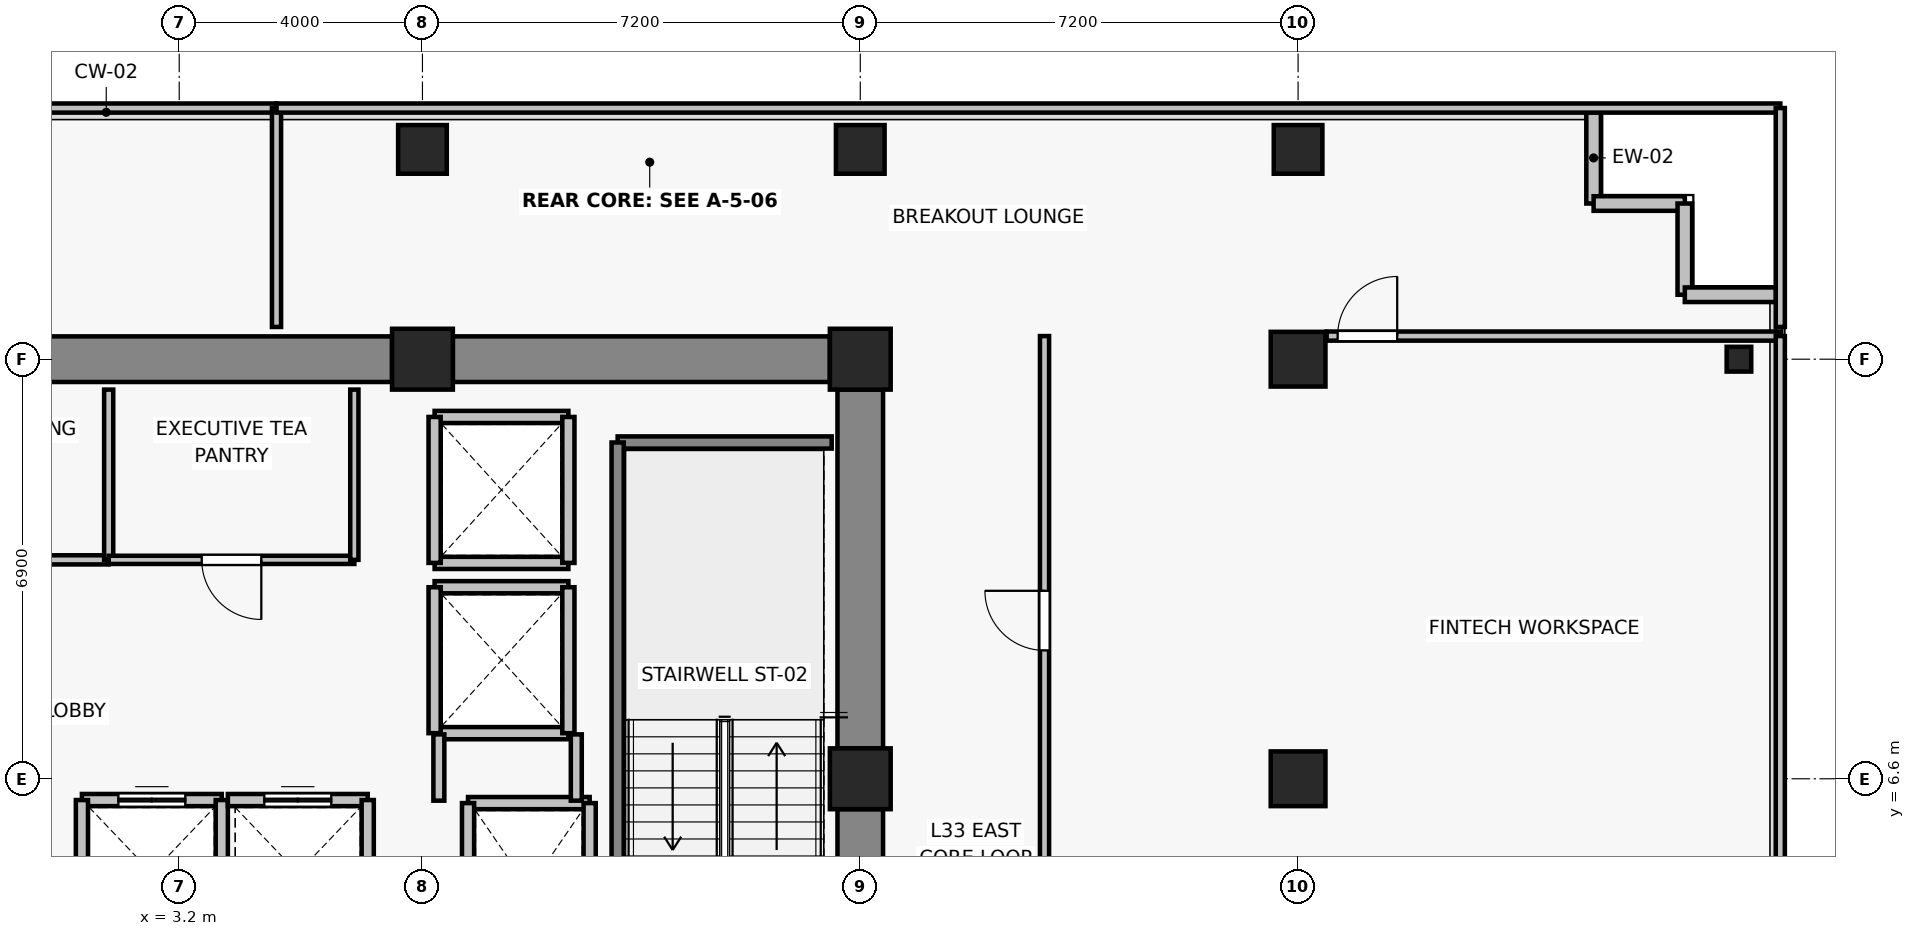
"""IFC4 building model, lengths in metres.
Left out: names, types, materials, properties, quantities, classifications, styles, units other than length and angle.
Written with IfcOpenShell. Run it as: python <this file> out.ifc"""

import sys

from ifc_helpers import new_model, si_unit, direction, frame, frame_2d, origin, origin_2d, place, context, subcontext, project, spatial, rectangle, i_section, extrude, source, transform, mapped, element, fill, save


model = new_model("IFC4")
c1 = context("Model", 3, precision=1e-05, world=origin(), true_north=direction((0.0, 1.0)))
c2 = subcontext(c1, "Body", "Model", "MODEL_VIEW")
j1 = project(units=[si_unit("LENGTHUNIT", "METRE"), si_unit("PLANEANGLEUNIT", "RADIAN")], contexts=[c1])
p1 = place(None, origin())
s1 = spatial("IfcSite", under=j1, at=p1, CompositionType="ELEMENT")
p2 = place(p1, origin())
s2 = spatial("IfcBuilding", under=s1, at=p2, CompositionType="ELEMENT")
p3 = place(p2, frame((0.0, 0.0, 119.8)))
s3 = spatial("IfcBuildingStorey", under=s2, at=p3, CompositionType="ELEMENT", Elevation=119.8)
for number, where, z_axis, x_axis in (
    (1, (14.4, 6.6, 0.0), (0.0, 0.0, 1.0), (1.0, 0.0, 0.0)),
    (2, (7.2, 13.5, 0.0), (0.0, 0.0, 1.0), (1.0, 0.0, 0.0)),
    (3, (14.4, 13.5, 0.0), (0.0, 0.0, 1.0), (1.0, 0.0, 0.0)),
):
    element("IfcColumn", number, at=place(p3, frame(where, z_axis=z_axis, x_axis=x_axis)), inside=s3, PredefinedType="COLUMN", context=c2, shape_type="SweptSolid", body=[
        extrude(rectangle(XDim=1.0, YDim=1.0, at=origin_2d()), origin(), (0.0, 0.0, 1.0), 3.3),
    ])
for number, where, z_axis, x_axis in (
    (4, (21.6, 6.6, 0.0), (0.0, 0.0, 1.0), (1.0, 0.0, 0.0)),
    (5, (21.6, 13.5, 0.0), (0.0, 0.0, 1.0), (1.0, 0.0, 0.0)),
):
    element("IfcColumn", number, at=place(p3, frame(where, z_axis=z_axis, x_axis=x_axis)), inside=s3, PredefinedType="COLUMN", context=c2, shape_type="SweptSolid", body=[
        extrude(rectangle(XDim=0.9, YDim=0.9, at=origin_2d()), origin(), (0.0, 0.0, 1.0), 3.3),
    ])
for number, where, z_axis, x_axis in (
    (6, (7.2, 16.95, 0.0), (0.0, 0.0, 1.0), (1.0, 0.0, 0.0)),
    (7, (14.4, 16.95, 0.0), (0.0, 0.0, 1.0), (1.0, 0.0, 0.0)),
    (8, (21.6, 16.95, 0.0), (0.0, 0.0, 1.0), (1.0, 0.0, 0.0)),
):
    element("IfcColumn", number, at=place(p3, frame(where, z_axis=z_axis, x_axis=x_axis)), inside=s3, PredefinedType="COLUMN", context=c2, shape_type="SweptSolid", body=[
        extrude(rectangle(XDim=0.8, YDim=0.8, at=origin_2d()), origin(), (0.0, 0.0, 1.0), 3.3),
    ])
p4 = place(p3, frame((28.85, 13.5, 0.0), z_axis=(0.0, 0.0, 1.0), x_axis=(1.0, 0.0, 0.0)))
e9 = element("IfcColumn", 9, at=p4, inside=s3, PredefinedType="COLUMN", context=c2, shape_type="SweptSolid", body=[
    extrude(i_section(OverallWidth=0.404, OverallDepth=0.407, WebThickness=0.022, FlangeThickness=0.032, FilletRadius=0.015, at=origin_2d()), origin(), (0.0, 0.0, 1.0), 3.3),
])
p5 = place(p3, frame((-6.7, 13.5, 0.0), z_axis=(0.0, 0.0, 1.0), x_axis=(1.0, 0.0, 0.0)))
e10 = element("IfcWall", 10, at=p5, inside=s3, PredefinedType="SHEAR", context=c2, shape_type="SweptSolid", body=[
    extrude(rectangle(XDim=13.4, YDim=0.75, at=frame_2d((6.7, 0.0))), origin(), (0.0, 0.0, 1.0), 3.075),
])
p6 = place(p3, frame((7.7, 13.5, 0.0), z_axis=(0.0, 0.0, 1.0), x_axis=(1.0, 0.0, 0.0)))
e11 = element("IfcWall", 11, at=p6, inside=s3, PredefinedType="SHEAR", context=c2, shape_type="SweptSolid", body=[
    extrude(rectangle(XDim=6.2, YDim=0.75, at=frame_2d((3.1, 0.0))), origin(), (0.0, 0.0, 1.0), 3.075),
])
p7 = place(p3, frame((14.4, -0.7, 0.0), z_axis=(0.0, 0.0, 1.0), x_axis=(0.0, 1.0, 0.0)))
e12 = element("IfcWall", 12, at=p7, inside=s3, PredefinedType="SHEAR", context=c2, shape_type="SweptSolid", body=[
    extrude(rectangle(XDim=6.8, YDim=0.75, at=frame_2d((3.4, 0.0))), origin(), (0.0, 0.0, 1.0), 3.075),
])
p8 = place(p3, frame((14.4, 7.1, 0.0), z_axis=(0.0, 0.0, 1.0), x_axis=(0.0, 1.0, 0.0)))
e13 = element("IfcWall", 13, at=p8, inside=s3, PredefinedType="SHEAR", context=c2, shape_type="SweptSolid", body=[
    extrude(rectangle(XDim=5.9, YDim=0.75, at=frame_2d((2.95, 0.0))), origin(), (0.0, 0.0, 1.0), 3.075),
])
for number, where, z_axis, x_axis in (
    (14, (26.46, 16.06, 0.0), (0.0, 0.0, 1.0), (0.0, 1.0, 0.0)),
    (15, (27.96, 16.06, 0.0), (0.0, 0.0, 1.0), (-1.0, 0.0, 0.0)),
    (16, (27.96, 14.56, 0.0), (0.0, 0.0, 1.0), (0.0, 1.0, 0.0)),
    (17, (29.46, 14.56, 0.0), (0.0, 0.0, 1.0), (-1.0, 0.0, 0.0)),
):
    element("IfcWall", number, at=place(p3, frame(where, z_axis=z_axis, x_axis=x_axis)), inside=s3, PredefinedType="SOLIDWALL", context=c2, shape_type="SweptSolid", body=[
        extrude(rectangle(XDim=1.5, YDim=0.24, at=frame_2d((0.75, 0.0))), origin(), (0.0, 0.0, 1.0), 3.075),
    ])
p9 = place(p3, frame((7.95, 6.2, 0.0), z_axis=(0.0, 0.0, 1.0), x_axis=(1.0, 0.0, 0.0)))
e18 = element("IfcWall", 18, at=p9, inside=s3, PredefinedType="SOLIDWALL", context=c2, shape_type="SweptSolid", body=[
    extrude(rectangle(XDim=2.0, YDim=0.2, at=frame_2d((1.0, 0.0))), origin(), (0.0, 0.0, 1.0), 3.075),
])
for number, where, z_axis, x_axis in (
    (19, (7.95, 3.4, 0.0), (0.0, 0.0, 1.0), (0.0, 1.0, 0.0)),
    (20, (9.95, 6.2, 0.0), (0.0, 0.0, 1.0), (0.0, -1.0, 0.0)),
):
    element("IfcWall", number, at=place(p3, frame(where, z_axis=z_axis, x_axis=x_axis)), inside=s3, PredefinedType="SOLIDWALL", context=c2, shape_type="SweptSolid", body=[
        extrude(rectangle(XDim=2.8, YDim=0.2, at=frame_2d((1.4, 0.0))), origin(), (0.0, 0.0, 1.0), 3.075),
    ])
p10 = place(p3, frame((1.6, 6.25, 0.0), z_axis=(0.0, 0.0, 1.0), x_axis=(1.0, 0.0, 0.0)))
e21 = element("IfcWall", 21, at=p10, inside=s3, PredefinedType="SOLIDWALL", context=c2, shape_type="SweptSolid", body=[
    extrude(rectangle(XDim=2.3, YDim=0.2, at=frame_2d((1.15, 0.0))), origin(), (0.0, 0.0, 1.0), 3.075),
])
p11 = place(p10, frame((0.6, 0.0, 0.0)))
e22 = element("IfcOpeningElement", 22, at=p11, cuts=e21, PredefinedType="OPENING", context=c2, shape_type="SweptSolid", body=[
    extrude(rectangle(XDim=1.1, YDim=2.2, at=frame_2d((0.55, 1.1))), frame((0.0, 0.11, 0.0), z_axis=(0.0, -1.0, 0.0), x_axis=(1.0, 0.0, 0.0)), (0.0, 0.0, 1.0), 0.22),
])
for number, where, z_axis, x_axis in (
    (23, (1.6, 3.85, 0.0), (0.0, 0.0, 1.0), (0.0, 1.0, 0.0)),
    (24, (3.9, 6.25, 0.0), (0.0, 0.0, 1.0), (0.0, -1.0, 0.0)),
):
    element("IfcWall", number, at=place(p3, frame(where, z_axis=z_axis, x_axis=x_axis)), inside=s3, PredefinedType="SOLIDWALL", context=c2, shape_type="SweptSolid", body=[
        extrude(rectangle(XDim=2.4, YDim=0.2, at=frame_2d((1.2, 0.0))), origin(), (0.0, 0.0, 1.0), 3.075),
    ])
p12 = place(p3, frame((4.0, 6.25, 0.0), z_axis=(0.0, 0.0, 1.0), x_axis=(1.0, 0.0, 0.0)))
e25 = element("IfcWall", 25, at=p12, inside=s3, PredefinedType="SOLIDWALL", context=c2, shape_type="SweptSolid", body=[
    extrude(rectangle(XDim=2.3, YDim=0.2, at=frame_2d((1.15, 0.0))), origin(), (0.0, 0.0, 1.0), 3.075),
])
p13 = place(p12, frame((0.6, 0.0, 0.0)))
e26 = element("IfcOpeningElement", 26, at=p13, cuts=e25, PredefinedType="OPENING", context=c2, shape_type="SweptSolid", body=[
    extrude(rectangle(XDim=1.1, YDim=2.2, at=frame_2d((0.55, 1.1))), frame((0.0, 0.11, 0.0), z_axis=(0.0, -1.0, 0.0), x_axis=(1.0, 0.0, 0.0)), (0.0, 0.0, 1.0), 0.22),
])
p14 = place(p3, frame((6.3, 6.25, 0.0), z_axis=(0.0, 0.0, 1.0), x_axis=(0.0, -1.0, 0.0)))
e27 = element("IfcWall", 27, at=p14, inside=s3, PredefinedType="SOLIDWALL", context=c2, shape_type="SweptSolid", body=[
    extrude(rectangle(XDim=2.4, YDim=0.2, at=frame_2d((1.2, 0.0))), origin(), (0.0, 0.0, 1.0), 3.075),
])
for number, where, z_axis, x_axis in (
    (28, (9.6, 7.35, 0.0), (0.0, 0.0, 1.0), (-1.0, 0.0, 0.0)),
    (29, (7.4, 9.75, 0.0), (0.0, 0.0, 1.0), (1.0, 0.0, 0.0)),
):
    element("IfcWall", number, at=place(p3, frame(where, z_axis=z_axis, x_axis=x_axis)), inside=s3, PredefinedType="SOLIDWALL", context=c2, shape_type="SweptSolid", body=[
        extrude(rectangle(XDim=2.2, YDim=0.2, at=frame_2d((1.1, 0.0))), origin(), (0.0, 0.0, 1.0), 2.515),
    ])
p15 = place(p3, frame((7.4, 7.35, 0.0), z_axis=(0.0, 0.0, 1.0), x_axis=(0.0, 1.0, 0.0)))
e30 = element("IfcWall", 30, at=p15, inside=s3, PredefinedType="SOLIDWALL", context=c2, shape_type="SweptSolid", body=[
    extrude(rectangle(XDim=2.4, YDim=0.2, at=frame_2d((1.2, 0.0))), origin(), (0.0, 0.0, 1.0), 2.515),
])
p16 = place(p3, frame((9.6, 9.75, 0.0), z_axis=(0.0, 0.0, 1.0), x_axis=(0.0, -1.0, 0.0)))
e31 = element("IfcWall", 31, at=p16, inside=s3, PredefinedType="SOLIDWALL", context=c2, shape_type="SweptSolid", body=[
    extrude(rectangle(XDim=2.4, YDim=0.2, at=frame_2d((1.2, 0.0))), origin(), (0.0, 0.0, 1.0), 3.075),
])
for number, where, z_axis, x_axis in (
    (32, (9.6, 10.15, 0.0), (0.0, 0.0, 1.0), (-1.0, 0.0, 0.0)),
    (33, (7.4, 12.55, 0.0), (0.0, 0.0, 1.0), (1.0, 0.0, 0.0)),
):
    element("IfcWall", number, at=place(p3, frame(where, z_axis=z_axis, x_axis=x_axis)), inside=s3, PredefinedType="SOLIDWALL", context=c2, shape_type="SweptSolid", body=[
        extrude(rectangle(XDim=2.2, YDim=0.2, at=frame_2d((1.1, 0.0))), origin(), (0.0, 0.0, 1.0), 2.515),
    ])
p17 = place(p3, frame((7.4, 10.15, 0.0), z_axis=(0.0, 0.0, 1.0), x_axis=(0.0, 1.0, 0.0)))
e34 = element("IfcWall", 34, at=p17, inside=s3, PredefinedType="SOLIDWALL", context=c2, shape_type="SweptSolid", body=[
    extrude(rectangle(XDim=2.4, YDim=0.2, at=frame_2d((1.2, 0.0))), origin(), (0.0, 0.0, 1.0), 2.515),
])
p18 = place(p3, frame((9.6, 12.55, 0.0), z_axis=(0.0, 0.0, 1.0), x_axis=(0.0, -1.0, 0.0)))
e35 = element("IfcWall", 35, at=p18, inside=s3, PredefinedType="SOLIDWALL", context=c2, shape_type="SweptSolid", body=[
    extrude(rectangle(XDim=2.4, YDim=0.2, at=frame_2d((1.2, 0.0))), origin(), (0.0, 0.0, 1.0), 3.075),
])
p19 = place(p3, frame((10.41, 12.13, 0.0), z_axis=(0.0, 0.0, 1.0), x_axis=(1.0, 0.0, 0.0)))
e36 = element("IfcWall", 36, at=p19, inside=s3, PredefinedType="SOLIDWALL", context=c2, shape_type="SweptSolid", body=[
    extrude(rectangle(XDim=3.52, YDim=0.2, at=frame_2d((1.76, 0.0))), origin(), (0.0, 0.0, 1.0), 3.075),
])
p20 = place(p3, frame((10.41, 3.29, 0.0), z_axis=(0.0, 0.0, 1.0), x_axis=(0.0, 1.0, 0.0)))
e37 = element("IfcWall", 37, at=p20, inside=s3, PredefinedType="SOLIDWALL", context=c2, shape_type="SweptSolid", body=[
    extrude(rectangle(XDim=8.84, YDim=0.2, at=frame_2d((4.42, 0.0))), origin(), (0.0, 0.0, 1.0), 3.075),
])
p21 = place(p3, frame((7.47, 6.24, 0.0), z_axis=(0.0, 0.0, 1.0), x_axis=(0.0, 1.0, 0.0)))
e38 = element("IfcWall", 38, at=p21, inside=s3, PredefinedType="PARTITIONING", context=c2, shape_type="SweptSolid", body=[
    extrude(rectangle(XDim=1.09, YDim=0.18, at=frame_2d((0.545, 0.0))), origin(), (0.0, 0.0, 1.0), 2.515),
])
p22 = place(p3, frame((9.73, 7.33, 0.0), z_axis=(0.0, 0.0, 1.0), x_axis=(0.0, -1.0, 0.0)))
e39 = element("IfcWall", 39, at=p22, inside=s3, PredefinedType="PARTITIONING", context=c2, shape_type="SweptSolid", body=[
    extrude(rectangle(XDim=1.09, YDim=0.18, at=frame_2d((0.545, 0.0))), origin(), (0.0, 0.0, 1.0), 3.075),
])
p23 = place(p3, frame((2.04, 10.2, 0.0), z_axis=(0.0, 0.0, 1.0), x_axis=(-1.0, 0.0, 0.0)))
e40 = element("IfcWall", 40, at=p23, inside=s3, PredefinedType="PARTITIONING", context=c2, shape_type="SweptSolid", body=[
    extrude(rectangle(XDim=4.16, YDim=0.15, at=frame_2d((2.08, 0.0))), origin(), (0.0, 0.0, 1.0), 3.075),
])
p24 = place(p23, frame((1.55, 0.0, 0.0)))
e41 = element("IfcOpeningElement", 41, at=p24, cuts=e40, PredefinedType="OPENING", context=c2, shape_type="SweptSolid", body=[
    extrude(rectangle(XDim=0.98, YDim=2.15, at=frame_2d((0.49, 1.075))), frame((0.0, 0.085, 0.0), z_axis=(0.0, -1.0, 0.0), x_axis=(1.0, 0.0, 0.0)), (0.0, 0.0, 1.0), 0.17),
])
p25 = place(p3, frame((2.04, 13.0, 0.0), z_axis=(0.0, 0.0, 1.0), x_axis=(0.0, -1.0, 0.0)))
e42 = element("IfcWall", 42, at=p25, inside=s3, PredefinedType="PARTITIONING", context=c2, shape_type="SweptSolid", body=[
    extrude(rectangle(XDim=2.8, YDim=0.15, at=frame_2d((1.4, 0.0))), origin(), (0.0, 0.0, 1.0), 3.075),
])
p26 = place(p3, frame((6.08, 10.2, 0.0), z_axis=(0.0, 0.0, 1.0), x_axis=(-1.0, 0.0, 0.0)))
e43 = element("IfcWall", 43, at=p26, inside=s3, PredefinedType="PARTITIONING", context=c2, shape_type="SweptSolid", body=[
    extrude(rectangle(XDim=4.04, YDim=0.135, at=frame_2d((2.02, 0.0))), origin(), (0.0, 0.0, 1.0), 3.075),
])
p27 = place(p26, frame((1.53, 0.0, 0.0)))
e44 = element("IfcOpeningElement", 44, at=p27, cuts=e43, PredefinedType="OPENING", context=c2, shape_type="SweptSolid", body=[
    extrude(rectangle(XDim=0.98, YDim=2.15, at=frame_2d((0.49, 1.075))), frame((0.0, 0.077, 0.0), z_axis=(0.0, -1.0, 0.0), x_axis=(1.0, 0.0, 0.0)), (0.0, 0.0, 1.0), 0.155),
])
p28 = place(p3, frame((6.08, 13.0, 0.0), z_axis=(0.0, 0.0, 1.0), x_axis=(0.0, -1.0, 0.0)))
e45 = element("IfcWall", 45, at=p28, inside=s3, PredefinedType="PARTITIONING", context=c2, shape_type="SweptSolid", body=[
    extrude(rectangle(XDim=2.8, YDim=0.135, at=frame_2d((1.4, 0.0))), origin(), (0.0, 0.0, 1.0), 3.075),
])
p29 = place(p3, frame((22.07, 13.88, 0.0), z_axis=(0.0, 0.0, 1.0), x_axis=(1.0, 0.0, 0.0)))
e46 = element("IfcWall", 46, at=p29, inside=s3, PredefinedType="PARTITIONING", context=c2, shape_type="SweptSolid", body=[
    extrude(rectangle(XDim=7.46, YDim=0.15, at=frame_2d((3.73, 0.0))), origin(), (0.0, 0.0, 1.0), 3.075),
])
p30 = place(p29, frame((0.18, 0.0, 0.0)))
e47 = element("IfcOpeningElement", 47, at=p30, cuts=e46, PredefinedType="OPENING", context=c2, shape_type="SweptSolid", body=[
    extrude(rectangle(XDim=0.98, YDim=2.15, at=frame_2d((0.49, 1.075))), frame((0.0, 0.085, 0.0), z_axis=(0.0, -1.0, 0.0), x_axis=(1.0, 0.0, 0.0)), (0.0, 0.0, 1.0), 0.17),
])
p31 = place(p3, frame((17.43, 4.522, 0.0), z_axis=(0.0, 0.0, 1.0), x_axis=(0.0, 1.0, 0.0)))
e48 = element("IfcWall", 48, at=p31, inside=s3, PredefinedType="PARTITIONING", context=c2, shape_type="SweptSolid", body=[
    extrude(rectangle(XDim=9.358, YDim=0.15, at=frame_2d((4.679, 0.0))), origin(), (0.0, 0.0, 1.0), 2.515),
])
p32 = place(p31, frame((4.189, 0.0, 0.0)))
e49 = element("IfcOpeningElement", 49, at=p32, cuts=e48, PredefinedType="OPENING", context=c2, shape_type="SweptSolid", body=[
    extrude(rectangle(XDim=0.98, YDim=2.15, at=frame_2d((0.49, 1.075))), frame((0.0, 0.085, 0.0), z_axis=(0.0, -1.0, 0.0), x_axis=(1.0, 0.0, 0.0)), (0.0, 0.0, 1.0), 0.17),
])
p33 = place(p3, frame((29.53, 13.88, 0.0), z_axis=(0.0, 0.0, 1.0), x_axis=(0.0, -1.0, 0.0)))
e50 = element("IfcWall", 50, at=p33, inside=s3, PredefinedType="PARTITIONING", context=c2, shape_type="SweptSolid", body=[
    extrude(rectangle(XDim=9.358, YDim=0.15, at=frame_2d((4.679, 0.0))), origin(), (0.0, 0.0, 1.0), 3.075),
])
p34 = place(p3, frame((-25.53, 17.63, 0.0), z_axis=(0.0, 0.0, 1.0), x_axis=(1.0, 0.0, 0.0)))
e51 = element("IfcWall", 51, at=p34, inside=s3, PredefinedType="PARTITIONING", context=c2, shape_type="SweptSolid", body=[
    extrude(rectangle(XDim=30.33, YDim=0.15, at=frame_2d((15.165, 0.0))), origin(), (0.0, 0.0, 1.0), 3.075),
])
p35 = place(p3, frame((4.8, 17.63, 0.0), z_axis=(0.0, 0.0, 1.0), x_axis=(0.0, -1.0, 0.0)))
e52 = element("IfcWall", 52, at=p35, inside=s3, PredefinedType="PARTITIONING", context=c2, shape_type="SweptSolid", body=[
    extrude(rectangle(XDim=3.6, YDim=0.15, at=frame_2d((1.8, 0.0))), origin(), (0.0, 0.0, 1.0), 2.565),
])
p36 = place(p3, frame((4.8, 17.63, 0.0), z_axis=(0.0, 0.0, 1.0), x_axis=(1.0, 0.0, 0.0)))
e53 = element("IfcWall", 53, at=p36, inside=s3, PredefinedType="PARTITIONING", context=c2, shape_type="SweptSolid", body=[
    extrude(rectangle(XDim=24.73, YDim=0.15, at=frame_2d((12.365, 0.0))), origin(), (0.0, 0.0, 1.0), 3.075),
])
p37 = place(p3, frame((29.53, 17.63, 0.0), z_axis=(0.0, 0.0, 1.0), x_axis=(0.0, -1.0, 0.0)))
e54 = element("IfcWall", 54, at=p37, inside=s3, PredefinedType="PARTITIONING", context=c2, shape_type="SweptSolid", body=[
    extrude(rectangle(XDim=3.6, YDim=0.15, at=frame_2d((1.8, 0.0))), origin(), (0.0, 0.0, 1.0), 3.075),
])
m1 = source(origin(), c2, "Body", "SweptSolid", [
    extrude(rectangle(XDim=1.1, YDim=2.2, at=frame_2d((0.55, 1.1))), frame((0.0, 0.025, 0.0), z_axis=(0.0, -1.0, 0.0), x_axis=(1.0, 0.0, 0.0)), (0.0, 0.0, 1.0), 0.05),
])
p38 = place(p11, origin())
e55 = element("IfcDoor", 55, at=p38, inside=s3, OperationType="DOUBLE_DOOR_SLIDING", PredefinedType="DOOR", context=c2, shape_type="MappedRepresentation", body=[
    mapped(m1, transform((0.0, 0.0, 0.0), x_axis=(1.0, 0.0, 0.0), y_axis=(0.0, 1.0, 0.0), z_axis=(0.0, 0.0, 1.0), scale=1.0)),
])
fill(e22, e55)
p39 = place(p13, origin())
e56 = element("IfcDoor", 56, at=p39, inside=s3, OperationType="DOUBLE_DOOR_SLIDING", PredefinedType="DOOR", context=c2, shape_type="MappedRepresentation", body=[
    mapped(m1, transform((0.0, 0.0, 0.0), x_axis=(1.0, 0.0, 0.0), y_axis=(0.0, 1.0, 0.0), z_axis=(0.0, 0.0, 1.0), scale=1.0)),
])
fill(e26, e56)
m2 = source(origin(), c2, "Body", "SweptSolid", [
    extrude(rectangle(XDim=0.98, YDim=2.15, at=frame_2d((0.49, 1.075))), frame((0.0, 0.025, 0.0), z_axis=(0.0, -1.0, 0.0), x_axis=(1.0, 0.0, 0.0)), (0.0, 0.0, 1.0), 0.05),
])
p40 = place(p27, origin())
e57 = element("IfcDoor", 57, at=p40, inside=s3, OperationType="SINGLE_SWING_LEFT", PredefinedType="DOOR", context=c2, shape_type="MappedRepresentation", body=[
    mapped(m2, transform((0.0, 0.0, 0.0), x_axis=(1.0, 0.0, 0.0), y_axis=(0.0, 1.0, 0.0), z_axis=(0.0, 0.0, 1.0), scale=1.0)),
])
fill(e44, e57)
p41 = place(p32, origin())
e58 = element("IfcDoor", 58, at=p41, inside=s3, OperationType="SINGLE_SWING_RIGHT", PredefinedType="DOOR", context=c2, shape_type="MappedRepresentation", body=[
    mapped(m2, transform((0.0, 0.0, 0.0), x_axis=(1.0, 0.0, 0.0), y_axis=(0.0, 1.0, 0.0), z_axis=(0.0, 0.0, 1.0), scale=1.0)),
])
fill(e49, e58)
p42 = place(p30, origin())
e59 = element("IfcDoor", 59, at=p42, inside=s3, OperationType="SINGLE_SWING_RIGHT", PredefinedType="DOOR", context=c2, shape_type="MappedRepresentation", body=[
    mapped(m2, transform((0.0, 0.0, 0.0), x_axis=(1.0, 0.0, 0.0), y_axis=(0.0, 1.0, 0.0), z_axis=(0.0, 0.0, 1.0), scale=1.0)),
])
fill(e47, e59)
save(model, sys.argv[1])
